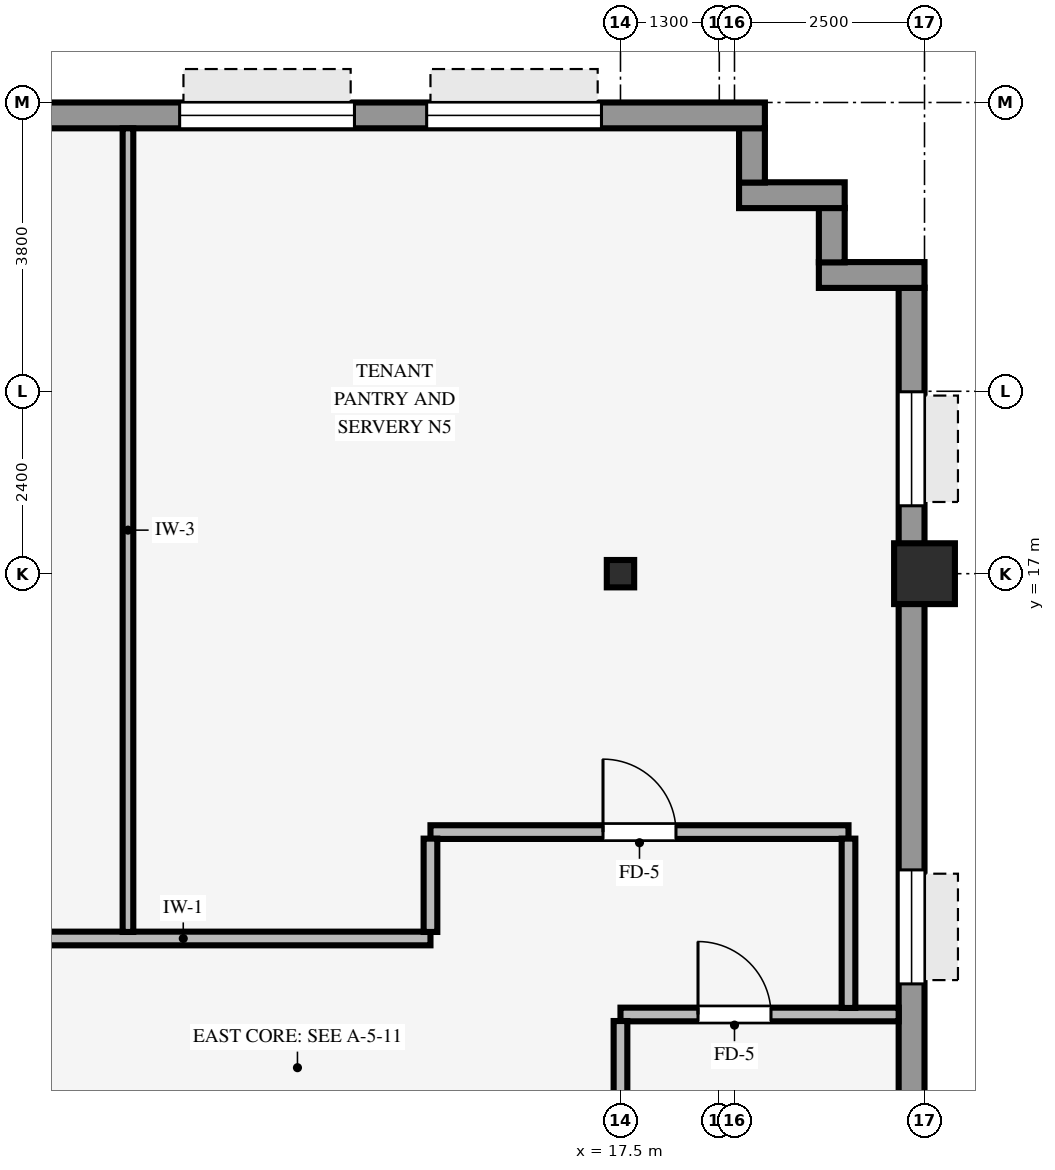
"""IFC4 building model, lengths in metres.
Left out: names, types, materials, properties, quantities, classifications, styles, units other than length and angle.
Written with IfcOpenShell. Run it as: python <this file> out.ifc"""

import sys

from ifc_helpers import new_model, si_unit, direction, frame, frame_2d, origin, origin_2d, place, context, subcontext, project, spatial, rectangle, hollow_rectangle, i_section, extrude, source, transform, mapped, element, fill, save


model = new_model("IFC4")
c1 = context("Model", 3, precision=1e-05, world=origin(), true_north=direction((0.0, 1.0)))
c2 = subcontext(c1, "Body", "Model", "MODEL_VIEW")
j1 = project(units=[si_unit("LENGTHUNIT", "METRE"), si_unit("PLANEANGLEUNIT", "RADIAN")], contexts=[c1])
p1 = place(None, origin())
s1 = spatial("IfcSite", under=j1, at=p1, CompositionType="ELEMENT")
p2 = place(p1, origin())
s2 = spatial("IfcBuilding", under=s1, at=p2, CompositionType="ELEMENT")
p3 = place(p2, frame((0.0, 0.0, 75.05)))
s3 = spatial("IfcBuildingStorey", under=s2, at=p3, CompositionType="ELEMENT", Elevation=75.05)
p4 = place(p3, frame((21.5, 17.0, 0.0), z_axis=(0.0, 0.0, 1.0), x_axis=(1.0, 0.0, 0.0)))
e1 = element("IfcColumn", 1, at=p4, inside=s3, PredefinedType="COLUMN", context=c2, shape_type="SweptSolid", body=[
    extrude(hollow_rectangle(XDim=0.8, YDim=0.8, WallThickness=0.055, InnerFilletRadius=0.055, OuterFilletRadius=0.11, at=origin_2d()), origin(), (0.0, 0.0, 1.0), 3.37),
])
p5 = place(p3, frame((17.5, 17.0, 0.0), z_axis=(0.0, 0.0, 1.0), x_axis=(1.0, 0.0, 0.0)))
e2 = element("IfcColumn", 2, at=p5, inside=s3, PredefinedType="COLUMN", context=c2, shape_type="SweptSolid", body=[
    extrude(i_section(OverallWidth=0.36, OverallDepth=0.36, WebThickness=0.021, FlangeThickness=0.021, FilletRadius=0.018, at=origin_2d()), origin(), (0.0, 0.0, 1.0), 3.37),
])
p6 = place(p3, frame((21.33, -20.764, 0.0), z_axis=(0.0, 0.0, 1.0), x_axis=(0.0, 1.0, 0.0)))
e3 = element("IfcWall", 3, at=p6, inside=s3, PredefinedType="STANDARD", context=c2, shape_type="SweptSolid", body=[
    extrude(rectangle(XDim=41.528, YDim=0.34, at=frame_2d((20.764, 0.0))), origin(), (0.0, 0.0, 1.0), 2.705),
])
p7 = place(p6, frame((26.014, 0.0, 0.0), z_axis=(0.0, 0.0, 1.0), x_axis=(-1.0, 0.0, 0.0)))
e4 = element("IfcOpeningElement", 4, at=p7, cuts=e3, PredefinedType="OPENING", context=c2, shape_type="SweptSolid", body=[
    extrude(rectangle(XDim=1.05, YDim=2.1, at=frame_2d((0.525, 1.05))), frame((0.0, 0.18, 0.0), z_axis=(0.0, -1.0, 0.0), x_axis=(1.0, 0.0, 0.0)), (0.0, 0.0, 1.0), 0.36),
])
p8 = place(p6, frame((1.371, 0.0, 0.8)))
e5 = element("IfcOpeningElement", 5, at=p8, cuts=e3, PredefinedType="OPENING", context=c2, shape_type="SweptSolid", body=[
    extrude(rectangle(XDim=1.5, YDim=1.6, at=frame_2d((0.75, 0.8))), frame((0.0, 0.18, 0.0), z_axis=(0.0, -1.0, 0.0), x_axis=(1.0, 0.0, 0.0)), (0.0, 0.0, 1.0), 0.36),
])
p9 = place(p6, frame((7.662, 0.0, 0.8)))
e6 = element("IfcOpeningElement", 6, at=p9, cuts=e3, PredefinedType="OPENING", context=c2, shape_type="SweptSolid", body=[
    extrude(rectangle(XDim=1.5, YDim=1.6, at=frame_2d((0.75, 0.8))), frame((0.0, 0.18, 0.0), z_axis=(0.0, -1.0, 0.0), x_axis=(1.0, 0.0, 0.0)), (0.0, 0.0, 1.0), 0.36),
])
p10 = place(p6, frame((12.603, 0.0, 0.8)))
e7 = element("IfcOpeningElement", 7, at=p10, cuts=e3, PredefinedType="OPENING", context=c2, shape_type="SweptSolid", body=[
    extrude(rectangle(XDim=1.5, YDim=1.6, at=frame_2d((0.75, 0.8))), frame((0.0, 0.18, 0.0), z_axis=(0.0, -1.0, 0.0), x_axis=(1.0, 0.0, 0.0)), (0.0, 0.0, 1.0), 0.36),
])
p11 = place(p6, frame((17.543, 0.0, 0.8)))
e8 = element("IfcOpeningElement", 8, at=p11, cuts=e3, PredefinedType="OPENING", context=c2, shape_type="SweptSolid", body=[
    extrude(rectangle(XDim=1.5, YDim=1.6, at=frame_2d((0.75, 0.8))), frame((0.0, 0.18, 0.0), z_axis=(0.0, -1.0, 0.0), x_axis=(1.0, 0.0, 0.0)), (0.0, 0.0, 1.0), 0.36),
])
p12 = place(p6, frame((22.485, 0.0, 0.8)))
e9 = element("IfcOpeningElement", 9, at=p12, cuts=e3, PredefinedType="OPENING", context=c2, shape_type="SweptSolid", body=[
    extrude(rectangle(XDim=1.5, YDim=1.6, at=frame_2d((0.75, 0.8))), frame((0.0, 0.18, 0.0), z_axis=(0.0, -1.0, 0.0), x_axis=(1.0, 0.0, 0.0)), (0.0, 0.0, 1.0), 0.36),
])
p13 = place(p6, frame((27.426, 0.0, 0.8)))
e10 = element("IfcOpeningElement", 10, at=p13, cuts=e3, PredefinedType="OPENING", context=c2, shape_type="SweptSolid", body=[
    extrude(rectangle(XDim=1.5, YDim=1.6, at=frame_2d((0.75, 0.8))), frame((0.0, 0.18, 0.0), z_axis=(0.0, -1.0, 0.0), x_axis=(1.0, 0.0, 0.0)), (0.0, 0.0, 1.0), 0.36),
])
p14 = place(p6, frame((32.366, 0.0, 0.8)))
e11 = element("IfcOpeningElement", 11, at=p14, cuts=e3, PredefinedType="OPENING", context=c2, shape_type="SweptSolid", body=[
    extrude(rectangle(XDim=1.5, YDim=1.6, at=frame_2d((0.75, 0.8))), frame((0.0, 0.18, 0.0), z_axis=(0.0, -1.0, 0.0), x_axis=(1.0, 0.0, 0.0)), (0.0, 0.0, 1.0), 0.36),
])
p15 = place(p6, frame((38.657, 0.0, 0.8)))
e12 = element("IfcOpeningElement", 12, at=p15, cuts=e3, PredefinedType="OPENING", context=c2, shape_type="SweptSolid", body=[
    extrude(rectangle(XDim=1.5, YDim=1.6, at=frame_2d((0.75, 0.8))), frame((0.0, 0.18, 0.0), z_axis=(0.0, -1.0, 0.0), x_axis=(1.0, 0.0, 0.0)), (0.0, 0.0, 1.0), 0.36),
])
p16 = place(p3, frame((20.11, 20.93, 0.0), z_axis=(0.0, 0.0, 1.0), x_axis=(1.0, 0.0, 0.0)))
e13 = element("IfcWall", 13, at=p16, inside=s3, PredefinedType="STANDARD", context=c2, shape_type="SweptSolid", body=[
    extrude(rectangle(XDim=1.39, YDim=0.34, at=frame_2d((0.695, 0.0))), origin(), (0.0, 0.0, 1.0), 3.36),
])
p17 = place(p3, frame((20.28, 21.096, 0.0), z_axis=(0.0, 0.0, 1.0), x_axis=(0.0, 1.0, 0.0)))
e14 = element("IfcWall", 14, at=p17, inside=s3, PredefinedType="STANDARD", context=c2, shape_type="SweptSolid", body=[
    extrude(rectangle(XDim=0.718, YDim=0.34, at=frame_2d((0.359, 0.0))), origin(), (0.0, 0.0, 1.0), 3.36),
])
p18 = place(p3, frame((19.06, 21.98, 0.0), z_axis=(0.0, 0.0, 1.0), x_axis=(1.0, 0.0, 0.0)))
e15 = element("IfcWall", 15, at=p18, inside=s3, PredefinedType="STANDARD", context=c2, shape_type="SweptSolid", body=[
    extrude(rectangle(XDim=1.39, YDim=0.34, at=frame_2d((0.695, 0.0))), origin(), (0.0, 0.0, 1.0), 3.36),
])
p19 = place(p3, frame((19.23, 22.146, 0.0), z_axis=(0.0, 0.0, 1.0), x_axis=(0.0, 1.0, 0.0)))
e16 = element("IfcWall", 16, at=p19, inside=s3, PredefinedType="STANDARD", context=c2, shape_type="SweptSolid", body=[
    extrude(rectangle(XDim=0.718, YDim=0.34, at=frame_2d((0.359, 0.0))), origin(), (0.0, 0.0, 1.0), 3.36),
])
p20 = place(p3, frame((-19.4, 23.03, 0.0), z_axis=(0.0, 0.0, 1.0), x_axis=(1.0, 0.0, 0.0)))
e17 = element("IfcWall", 17, at=p20, inside=s3, PredefinedType="STANDARD", context=c2, shape_type="SweptSolid", body=[
    extrude(rectangle(XDim=38.8, YDim=0.34, at=frame_2d((19.4, 0.0))), origin(), (0.0, 0.0, 1.0), 2.705),
])
p21 = place(p20, frame((2.15, 0.0, 0.8)))
e18 = element("IfcOpeningElement", 18, at=p21, cuts=e17, PredefinedType="OPENING", context=c2, shape_type="SweptSolid", body=[
    extrude(rectangle(XDim=2.3, YDim=1.62, at=frame_2d((1.15, 0.81))), frame((0.0, 0.18, 0.0), z_axis=(0.0, -1.0, 0.0), x_axis=(1.0, 0.0, 0.0)), (0.0, 0.0, 1.0), 0.36),
])
p22 = place(p20, frame((6.75, 0.0, 0.8)))
e19 = element("IfcOpeningElement", 19, at=p22, cuts=e17, PredefinedType="OPENING", context=c2, shape_type="SweptSolid", body=[
    extrude(rectangle(XDim=2.3, YDim=1.62, at=frame_2d((1.15, 0.81))), frame((0.0, 0.18, 0.0), z_axis=(0.0, -1.0, 0.0), x_axis=(1.0, 0.0, 0.0)), (0.0, 0.0, 1.0), 0.36),
])
p23 = place(p20, frame((11.35, 0.0, 0.8)))
e20 = element("IfcOpeningElement", 20, at=p23, cuts=e17, PredefinedType="OPENING", context=c2, shape_type="SweptSolid", body=[
    extrude(rectangle(XDim=2.3, YDim=1.62, at=frame_2d((1.15, 0.81))), frame((0.0, 0.18, 0.0), z_axis=(0.0, -1.0, 0.0), x_axis=(1.0, 0.0, 0.0)), (0.0, 0.0, 1.0), 0.36),
])
p24 = place(p20, frame((15.95, 0.0, 0.8)))
e21 = element("IfcOpeningElement", 21, at=p24, cuts=e17, PredefinedType="OPENING", context=c2, shape_type="SweptSolid", body=[
    extrude(rectangle(XDim=2.3, YDim=1.62, at=frame_2d((1.15, 0.81))), frame((0.0, 0.18, 0.0), z_axis=(0.0, -1.0, 0.0), x_axis=(1.0, 0.0, 0.0)), (0.0, 0.0, 1.0), 0.36),
])
p25 = place(p20, frame((20.55, 0.0, 0.8)))
e22 = element("IfcOpeningElement", 22, at=p25, cuts=e17, PredefinedType="OPENING", context=c2, shape_type="SweptSolid", body=[
    extrude(rectangle(XDim=2.3, YDim=1.62, at=frame_2d((1.15, 0.81))), frame((0.0, 0.18, 0.0), z_axis=(0.0, -1.0, 0.0), x_axis=(1.0, 0.0, 0.0)), (0.0, 0.0, 1.0), 0.36),
])
p26 = place(p20, frame((25.15, 0.0, 0.8)))
e23 = element("IfcOpeningElement", 23, at=p26, cuts=e17, PredefinedType="OPENING", context=c2, shape_type="SweptSolid", body=[
    extrude(rectangle(XDim=2.3, YDim=1.62, at=frame_2d((1.15, 0.81))), frame((0.0, 0.18, 0.0), z_axis=(0.0, -1.0, 0.0), x_axis=(1.0, 0.0, 0.0)), (0.0, 0.0, 1.0), 0.36),
])
p27 = place(p20, frame((31.1, 0.0, 0.8)))
e24 = element("IfcOpeningElement", 24, at=p27, cuts=e17, PredefinedType="OPENING", context=c2, shape_type="SweptSolid", body=[
    extrude(rectangle(XDim=2.3, YDim=1.62, at=frame_2d((1.15, 0.81))), frame((0.0, 0.18, 0.0), z_axis=(0.0, -1.0, 0.0), x_axis=(1.0, 0.0, 0.0)), (0.0, 0.0, 1.0), 0.36),
])
p28 = place(p20, frame((34.35, 0.0, 0.8)))
e25 = element("IfcOpeningElement", 25, at=p28, cuts=e17, PredefinedType="OPENING", context=c2, shape_type="SweptSolid", body=[
    extrude(rectangle(XDim=2.3, YDim=1.62, at=frame_2d((1.15, 0.81))), frame((0.0, 0.18, 0.0), z_axis=(0.0, -1.0, 0.0), x_axis=(1.0, 0.0, 0.0)), (0.0, 0.0, 1.0), 0.36),
])
p29 = place(p3, frame((17.5, 11.2, 0.0), z_axis=(0.0, 0.0, 1.0), x_axis=(1.0, 0.0, 0.0)))
e26 = element("IfcWall", 26, at=p29, inside=s3, PredefinedType="PARTITIONING", context=c2, shape_type="SweptSolid", body=[
    extrude(rectangle(XDim=3.66, YDim=0.18, at=frame_2d((1.83, 0.0))), origin(), (0.0, 0.0, 1.0), 3.36),
])
p30 = place(p29, frame((1.02, 0.0, 0.0)))
e27 = element("IfcOpeningElement", 27, at=p30, cuts=e26, PredefinedType="OPENING", context=c2, shape_type="SweptSolid", body=[
    extrude(rectangle(XDim=0.96, YDim=2.1, at=frame_2d((0.48, 1.05))), frame((0.0, 0.1, 0.0), z_axis=(0.0, -1.0, 0.0), x_axis=(1.0, 0.0, 0.0)), (0.0, 0.0, 1.0), 0.2),
])
p31 = place(p3, frame((-15.0, 12.2, 0.0), z_axis=(0.0, 0.0, 1.0), x_axis=(1.0, 0.0, 0.0)))
e28 = element("IfcWall", 28, at=p31, inside=s3, PredefinedType="PARTITIONING", context=c2, shape_type="SweptSolid", body=[
    extrude(rectangle(XDim=30.0, YDim=0.18, at=frame_2d((15.0, 0.0))), origin(), (0.0, 0.0, 1.0), 3.36),
])
p32 = place(p31, frame((22.085, 0.0, 0.0)))
e29 = element("IfcOpeningElement", 29, at=p32, cuts=e28, PredefinedType="OPENING", context=c2, shape_type="SweptSolid", body=[
    extrude(rectangle(XDim=0.96, YDim=2.1, at=frame_2d((0.48, 1.05))), frame((0.0, 0.1, 0.0), z_axis=(0.0, -1.0, 0.0), x_axis=(1.0, 0.0, 0.0)), (0.0, 0.0, 1.0), 0.2),
])
p33 = place(p31, frame((16.175, 0.0, 0.0)))
e30 = element("IfcOpeningElement", 30, at=p33, cuts=e28, PredefinedType="OPENING", context=c2, shape_type="SweptSolid", body=[
    extrude(rectangle(XDim=0.96, YDim=2.1, at=frame_2d((0.48, 1.05))), frame((0.0, 0.1, 0.0), z_axis=(0.0, -1.0, 0.0), x_axis=(1.0, 0.0, 0.0)), (0.0, 0.0, 1.0), 0.2),
])
p34 = place(p31, frame((5.45, 0.0, 0.0)))
e31 = element("IfcOpeningElement", 31, at=p34, cuts=e28, PredefinedType="OPENING", context=c2, shape_type="SweptSolid", body=[
    extrude(rectangle(XDim=0.9, YDim=2.1, at=frame_2d((0.45, 1.05))), frame((0.0, 0.1, 0.0), z_axis=(0.0, -1.0, 0.0), x_axis=(1.0, 0.0, 0.0)), (0.0, 0.0, 1.0), 0.2),
])
p35 = place(p31, frame((2.85, 0.0, 0.0)))
e32 = element("IfcOpeningElement", 32, at=p35, cuts=e28, PredefinedType="OPENING", context=c2, shape_type="SweptSolid", body=[
    extrude(rectangle(XDim=0.9, YDim=2.1, at=frame_2d((0.45, 1.05))), frame((0.0, 0.1, 0.0), z_axis=(0.0, -1.0, 0.0), x_axis=(1.0, 0.0, 0.0)), (0.0, 0.0, 1.0), 0.2),
])
p36 = place(p31, frame((12.52, 0.0, 0.0)))
e33 = element("IfcOpeningElement", 33, at=p36, cuts=e28, PredefinedType="OPENING", context=c2, shape_type="SweptSolid", body=[
    extrude(rectangle(XDim=0.96, YDim=2.1, at=frame_2d((0.48, 1.05))), frame((0.0, 0.1, 0.0), z_axis=(0.0, -1.0, 0.0), x_axis=(1.0, 0.0, 0.0)), (0.0, 0.0, 1.0), 0.2),
])
p37 = place(p31, frame((7.95, 0.0, 0.0)))
e34 = element("IfcOpeningElement", 34, at=p37, cuts=e28, PredefinedType="OPENING", context=c2, shape_type="SweptSolid", body=[
    extrude(rectangle(XDim=0.9, YDim=2.1, at=frame_2d((0.45, 1.05))), frame((0.0, 0.1, 0.0), z_axis=(0.0, -1.0, 0.0), x_axis=(1.0, 0.0, 0.0)), (0.0, 0.0, 1.0), 0.2),
])
p38 = place(p3, frame((15.0, 13.6, 0.0), z_axis=(0.0, 0.0, 1.0), x_axis=(1.0, 0.0, 0.0)))
e35 = element("IfcWall", 35, at=p38, inside=s3, PredefinedType="PARTITIONING", context=c2, shape_type="SweptSolid", body=[
    extrude(rectangle(XDim=5.5, YDim=0.18, at=frame_2d((2.75, 0.0))), origin(), (0.0, 0.0, 1.0), 2.942),
])
p39 = place(p38, frame((2.27, 0.0, 0.0)))
e36 = element("IfcOpeningElement", 36, at=p39, cuts=e35, PredefinedType="OPENING", context=c2, shape_type="SweptSolid", body=[
    extrude(rectangle(XDim=0.96, YDim=2.1, at=frame_2d((0.48, 1.05))), frame((0.0, 0.1, 0.0), z_axis=(0.0, -1.0, 0.0), x_axis=(1.0, 0.0, 0.0)), (0.0, 0.0, 1.0), 0.2),
])
p40 = place(p3, frame((11.02, 12.286, 0.0), z_axis=(0.0, 0.0, 1.0), x_axis=(0.0, 1.0, 0.0)))
e37 = element("IfcWall", 37, at=p40, inside=s3, PredefinedType="PARTITIONING", context=c2, shape_type="SweptSolid", body=[
    extrude(rectangle(XDim=10.574, YDim=0.14, at=frame_2d((5.287, 0.0))), origin(), (0.0, 0.0, 1.0), 3.36),
])
p41 = place(p3, frame((15.0, 12.286, 0.0), z_axis=(0.0, 0.0, 1.0), x_axis=(0.0, 1.0, 0.0)))
e38 = element("IfcWall", 38, at=p41, inside=s3, PredefinedType="PARTITIONING", context=c2, shape_type="SweptSolid", body=[
    extrude(rectangle(XDim=1.228, YDim=0.18, at=frame_2d((0.614, 0.0))), origin(), (0.0, 0.0, 1.0), 3.36),
])
p42 = place(p3, frame((17.5, 10.146, 0.0), z_axis=(0.0, 0.0, 1.0), x_axis=(0.0, 1.0, 0.0)))
e39 = element("IfcWall", 39, at=p42, inside=s3, PredefinedType="PARTITIONING", context=c2, shape_type="SweptSolid", body=[
    extrude(rectangle(XDim=0.968, YDim=0.18, at=frame_2d((0.484, 0.0))), origin(), (0.0, 0.0, 1.0), 2.738),
])
p43 = place(p3, frame((20.5, 11.286, 0.0), z_axis=(0.0, 0.0, 1.0), x_axis=(0.0, 1.0, 0.0)))
e40 = element("IfcWall", 40, at=p43, inside=s3, PredefinedType="PARTITIONING", context=c2, shape_type="SweptSolid", body=[
    extrude(rectangle(XDim=2.228, YDim=0.18, at=frame_2d((1.114, 0.0))), origin(), (0.0, 0.0, 1.0), 3.36),
])
m1 = source(origin(), c2, "Body", "SweptSolid", [
    extrude(rectangle(XDim=1.5, YDim=1.6, at=frame_2d((0.75, 0.8))), frame((0.0, 0.03, 0.0), z_axis=(0.0, -1.0, 0.0), x_axis=(1.0, 0.0, 0.0)), (0.0, 0.0, 1.0), 0.06),
])
p44 = place(p14, origin())
e41 = element("IfcWindow", 41, at=p44, inside=s3, PartitioningType="SINGLE_PANEL", PredefinedType="WINDOW", context=c2, shape_type="MappedRepresentation", body=[
    mapped(m1, transform((0.0, 0.0, 0.0), scale=1.0)),
])
fill(e11, e41)
p45 = place(p15, origin())
e42 = element("IfcWindow", 42, at=p45, inside=s3, PartitioningType="SINGLE_PANEL", PredefinedType="WINDOW", context=c2, shape_type="MappedRepresentation", body=[
    mapped(m1, transform((0.0, 0.0, 0.0), scale=1.0)),
])
fill(e12, e42)
m2 = source(origin(), c2, "Body", "SweptSolid", [
    extrude(rectangle(XDim=2.3, YDim=1.62, at=frame_2d((1.15, 0.81))), frame((0.0, 0.03, 0.0), z_axis=(0.0, -1.0, 0.0), x_axis=(1.0, 0.0, 0.0)), (0.0, 0.0, 1.0), 0.06),
])
p46 = place(p27, origin())
e43 = element("IfcWindow", 43, at=p46, inside=s3, PartitioningType="SINGLE_PANEL", PredefinedType="WINDOW", context=c2, shape_type="MappedRepresentation", body=[
    mapped(m2, transform((0.0, 0.0, 0.0), scale=1.0)),
])
fill(e24, e43)
p47 = place(p28, origin())
e44 = element("IfcWindow", 44, at=p47, inside=s3, PartitioningType="SINGLE_PANEL", PredefinedType="WINDOW", context=c2, shape_type="MappedRepresentation", body=[
    mapped(m2, transform((0.0, 0.0, 0.0), scale=1.0)),
])
fill(e25, e44)
m3 = source(origin(), c2, "Body", "SweptSolid", [
    extrude(rectangle(XDim=0.96, YDim=2.1, at=frame_2d((0.48, 1.05))), frame((0.0, 0.025, 0.0), z_axis=(0.0, -1.0, 0.0), x_axis=(1.0, 0.0, 0.0)), (0.0, 0.0, 1.0), 0.05),
])
p48 = place(p39, origin())
e45 = element("IfcDoor", 45, at=p48, inside=s3, OperationType="SINGLE_SWING_LEFT", PredefinedType="DOOR", context=c2, shape_type="MappedRepresentation", body=[
    mapped(m3, transform((0.0, 0.0, 0.0), scale=1.0)),
])
fill(e36, e45)
p49 = place(p30, origin())
e46 = element("IfcDoor", 46, at=p49, inside=s3, OperationType="SINGLE_SWING_LEFT", PredefinedType="DOOR", context=c2, shape_type="MappedRepresentation", body=[
    mapped(m3, transform((0.0, 0.0, 0.0), scale=1.0)),
])
fill(e27, e46)
save(model, sys.argv[1])
